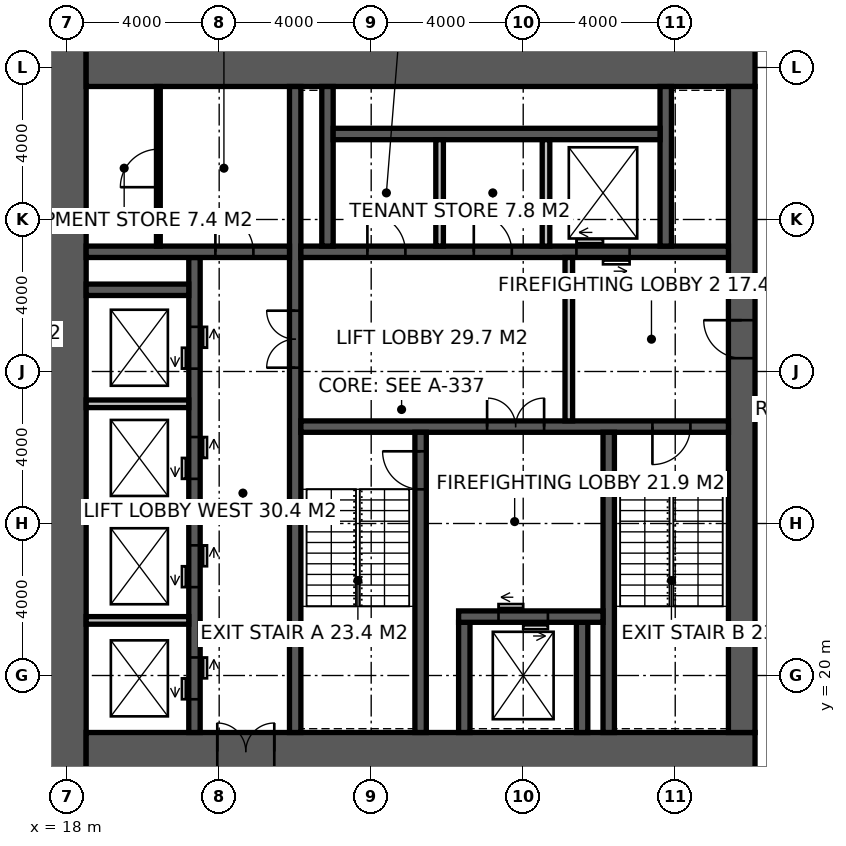
"""IFC4 building model, lengths in metres.
Left out: names, types, materials, properties, quantities, classifications, styles, units other than length and angle.
Written with IfcOpenShell. Run it as: python <this file> out.ifc"""

import sys

from ifc_helpers import new_model, si_unit, direction, frame, frame_2d, origin, place, context, subcontext, project, spatial, rectangle, extrude, element, fill, save


model = new_model("IFC4")
c1 = context("Model", 3, precision=1e-05, world=origin(), true_north=direction((0.0, 1.0)))
c2 = subcontext(c1, "Body", "Model", "MODEL_VIEW")
j1 = project(units=[si_unit("LENGTHUNIT", "METRE"), si_unit("PLANEANGLEUNIT", "RADIAN")], contexts=[c1])
p1 = place(None, origin())
s1 = spatial("IfcSite", under=j1, at=p1, CompositionType="ELEMENT")
p2 = place(p1, origin())
s2 = spatial("IfcBuilding", under=s1, at=p2, CompositionType="ELEMENT")
p3 = place(p2, frame((0.0, 0.0, 226.2)))
s3 = spatial("IfcBuildingStorey", under=s2, at=p3, CompositionType="ELEMENT", Elevation=226.2)
p4 = place(p3, frame((18.0, 17.5, -0.15), z_axis=(0.0, 0.0, 1.0), x_axis=(0.0, 1.0, 0.0)))
e1 = element("IfcWall", 1, at=p4, inside=s3, PredefinedType="SHEAR", context=c2, shape_type="SweptSolid", body=[
    extrude(rectangle(XDim=19.0, YDim=1.0, at=frame_2d((9.5, 0.0))), origin(), (0.0, 0.0, 1.0), 4.0),
])
p5 = place(p3, frame((18.5, 18.0, -0.15), z_axis=(0.0, 0.0, 1.0), x_axis=(1.0, 0.0, 0.0)))
e2 = element("IfcWall", 2, at=p5, inside=s3, PredefinedType="SHEAR", context=c2, shape_type="SweptSolid", body=[
    extrude(rectangle(XDim=17.6, YDim=1.0, at=frame_2d((8.8, 0.0))), origin(), (0.0, 0.0, 1.0), 4.0),
])
p6 = place(p5, frame((3.45, 0.0, 0.15)))
e3 = element("IfcOpeningElement", 3, at=p6, cuts=e2, PredefinedType="OPENING", context=c2, shape_type="SweptSolid", body=[
    extrude(rectangle(XDim=1.5, YDim=2.4, at=frame_2d((0.75, 1.2))), frame((0.0, 0.51, 0.0), z_axis=(0.0, -1.0, 0.0), x_axis=(1.0, 0.0, 0.0)), (0.0, 0.0, 1.0), 1.02),
])
p7 = place(p3, frame((18.5, 36.0, -0.15), z_axis=(0.0, 0.0, 1.0), x_axis=(1.0, 0.0, 0.0)))
e4 = element("IfcWall", 4, at=p7, inside=s3, PredefinedType="SHEAR", context=c2, shape_type="SweptSolid", body=[
    extrude(rectangle(XDim=17.6, YDim=1.0, at=frame_2d((8.8, 0.0))), origin(), (0.0, 0.0, 1.0), 4.0),
])
p8 = place(p3, frame((35.75, 18.5, -0.15), z_axis=(0.0, 0.0, 1.0), x_axis=(0.0, 1.0, 0.0)))
e5 = element("IfcWall", 5, at=p8, inside=s3, PredefinedType="SHEAR", context=c2, shape_type="SweptSolid", body=[
    extrude(rectangle(XDim=17.0, YDim=0.7, at=frame_2d((8.5, 0.0))), origin(), (0.0, 0.0, 1.0), 4.0),
])
p9 = place(p8, frame((9.85, 0.0, 0.15)))
e6 = element("IfcOpeningElement", 6, at=p9, cuts=e5, PredefinedType="OPENING", context=c2, shape_type="SweptSolid", body=[
    extrude(rectangle(XDim=1.0, YDim=2.2, at=frame_2d((0.5, 1.1))), frame((0.0, 0.36, 0.0), z_axis=(0.0, -1.0, 0.0), x_axis=(1.0, 0.0, 0.0)), (0.0, 0.0, 1.0), 0.72),
])
p10 = place(p3, frame((24.0, 18.5, -0.15), z_axis=(0.0, 0.0, 1.0), x_axis=(0.0, 1.0, 0.0)))
e7 = element("IfcWall", 7, at=p10, inside=s3, PredefinedType="SHEAR", context=c2, shape_type="SweptSolid", body=[
    extrude(rectangle(XDim=17.0, YDim=0.3, at=frame_2d((8.5, 0.0))), origin(), (0.0, 0.0, 1.0), 4.0),
])
p11 = place(p10, frame((9.6, 0.0, 0.15)))
e8 = element("IfcOpeningElement", 8, at=p11, cuts=e7, PredefinedType="OPENING", context=c2, shape_type="SweptSolid", body=[
    extrude(rectangle(XDim=1.5, YDim=2.4, at=frame_2d((0.75, 1.2))), frame((0.0, 0.16, 0.0), z_axis=(0.0, -1.0, 0.0), x_axis=(1.0, 0.0, 0.0)), (0.0, 0.0, 1.0), 0.32),
])
p12 = place(p3, frame((24.15, 26.55, -0.15), z_axis=(0.0, 0.0, 1.0), x_axis=(1.0, 0.0, 0.0)))
e9 = element("IfcWall", 9, at=p12, inside=s3, PredefinedType="SHEAR", context=c2, shape_type="SweptSolid", body=[
    extrude(rectangle(XDim=11.25, YDim=0.3, at=frame_2d((5.625, 0.0))), origin(), (0.0, 0.0, 1.0), 4.0),
])
p13 = place(p12, frame((9.25, 0.0, 0.15)))
e10 = element("IfcOpeningElement", 10, at=p13, cuts=e9, PredefinedType="OPENING", context=c2, shape_type="SweptSolid", body=[
    extrude(rectangle(XDim=1.0, YDim=2.2, at=frame_2d((0.5, 1.1))), frame((0.0, 0.16, 0.0), z_axis=(0.0, -1.0, 0.0), x_axis=(1.0, 0.0, 0.0)), (0.0, 0.0, 1.0), 0.32),
])
p14 = place(p12, frame((4.9, 0.0, 0.15)))
e11 = element("IfcOpeningElement", 11, at=p14, cuts=e9, PredefinedType="OPENING", context=c2, shape_type="SweptSolid", body=[
    extrude(rectangle(XDim=1.5, YDim=2.4, at=frame_2d((0.75, 1.2))), frame((0.0, 0.16, 0.0), z_axis=(0.0, -1.0, 0.0), x_axis=(1.0, 0.0, 0.0)), (0.0, 0.0, 1.0), 0.32),
])
p15 = place(p3, frame((27.3, 18.5, -0.15), z_axis=(0.0, 0.0, 1.0), x_axis=(0.0, 1.0, 0.0)))
e12 = element("IfcWall", 12, at=p15, inside=s3, PredefinedType="SHEAR", context=c2, shape_type="SweptSolid", body=[
    extrude(rectangle(XDim=7.9, YDim=0.3, at=frame_2d((3.95, 0.0))), origin(), (0.0, 0.0, 1.0), 4.0),
])
p16 = place(p15, frame((6.4, 0.0, 0.15)))
e13 = element("IfcOpeningElement", 13, at=p16, cuts=e12, PredefinedType="OPENING", context=c2, shape_type="SweptSolid", body=[
    extrude(rectangle(XDim=1.0, YDim=2.2, at=frame_2d((0.5, 1.1))), frame((0.0, 0.16, 0.0), z_axis=(0.0, -1.0, 0.0), x_axis=(1.0, 0.0, 0.0)), (0.0, 0.0, 1.0), 0.32),
])
p17 = place(p3, frame((32.25, 18.5, -0.15), z_axis=(0.0, 0.0, 1.0), x_axis=(0.0, 1.0, 0.0)))
e14 = element("IfcWall", 14, at=p17, inside=s3, PredefinedType="SHEAR", context=c2, shape_type="SweptSolid", body=[
    extrude(rectangle(XDim=7.9, YDim=0.3, at=frame_2d((3.95, 0.0))), origin(), (0.0, 0.0, 1.0), 4.0),
])
for number, where, z_axis, x_axis in (
    (15, (28.45, 18.5, -0.15), (0.0, 0.0, 1.0), (0.0, 1.0, 0.0)),
    (16, (31.55, 18.5, -0.15), (0.0, 0.0, 1.0), (0.0, 1.0, 0.0)),
):
    element("IfcWall", number, at=place(p3, frame(where, z_axis=z_axis, x_axis=x_axis)), inside=s3, PredefinedType="SHEAR", context=c2, shape_type="SweptSolid", body=[
        extrude(rectangle(XDim=2.9, YDim=0.3, at=frame_2d((1.45, 0.0))), origin(), (0.0, 0.0, 1.0), 4.0),
    ])
p18 = place(p3, frame((28.3, 21.55, -0.15), z_axis=(0.0, 0.0, 1.0), x_axis=(1.0, 0.0, 0.0)))
e17 = element("IfcWall", 17, at=p18, inside=s3, PredefinedType="SHEAR", context=c2, shape_type="SweptSolid", body=[
    extrude(rectangle(XDim=3.8, YDim=0.3, at=frame_2d((1.9, 0.0))), origin(), (0.0, 0.0, 1.0), 4.0),
])
p19 = place(p18, frame((1.05, 0.0, 0.15)))
e18 = element("IfcOpeningElement", 18, at=p19, cuts=e17, PredefinedType="OPENING", context=c2, shape_type="SweptSolid", body=[
    extrude(rectangle(XDim=1.3, YDim=2.4, at=frame_2d((0.65, 1.2))), frame((0.0, 0.16, 0.0), z_axis=(0.0, -1.0, 0.0), x_axis=(1.0, 0.0, 0.0)), (0.0, 0.0, 1.0), 0.32),
])
p20 = place(p3, frame((24.15, 31.15, -0.15), z_axis=(0.0, 0.0, 1.0), x_axis=(1.0, 0.0, 0.0)))
e19 = element("IfcWall", 19, at=p20, inside=s3, PredefinedType="SHEAR", context=c2, shape_type="SweptSolid", body=[
    extrude(rectangle(XDim=11.25, YDim=0.3, at=frame_2d((5.625, 0.0))), origin(), (0.0, 0.0, 1.0), 4.0),
])
p21 = place(p20, frame((1.75, 0.0, 0.15)))
e20 = element("IfcOpeningElement", 20, at=p21, cuts=e19, PredefinedType="OPENING", context=c2, shape_type="SweptSolid", body=[
    extrude(rectangle(XDim=1.0, YDim=2.2, at=frame_2d((0.5, 1.1))), frame((0.0, 0.16, 0.0), z_axis=(0.0, -1.0, 0.0), x_axis=(1.0, 0.0, 0.0)), (0.0, 0.0, 1.0), 0.32),
])
p22 = place(p20, frame((4.55, 0.0, 0.15)))
e21 = element("IfcOpeningElement", 21, at=p22, cuts=e19, PredefinedType="OPENING", context=c2, shape_type="SweptSolid", body=[
    extrude(rectangle(XDim=1.0, YDim=2.2, at=frame_2d((0.5, 1.1))), frame((0.0, 0.16, 0.0), z_axis=(0.0, -1.0, 0.0), x_axis=(1.0, 0.0, 0.0)), (0.0, 0.0, 1.0), 0.32),
])
p23 = place(p20, frame((7.25, 0.0, 0.15)))
e22 = element("IfcOpeningElement", 22, at=p23, cuts=e19, PredefinedType="OPENING", context=c2, shape_type="SweptSolid", body=[
    extrude(rectangle(XDim=1.4, YDim=2.4, at=frame_2d((0.7, 1.2))), frame((0.0, 0.16, 0.0), z_axis=(0.0, -1.0, 0.0), x_axis=(1.0, 0.0, 0.0)), (0.0, 0.0, 1.0), 0.32),
])
p24 = place(p3, frame((21.35, 18.5, -0.15), z_axis=(0.0, 0.0, 1.0), x_axis=(0.0, 1.0, 0.0)))
e23 = element("IfcWall", 23, at=p24, inside=s3, PredefinedType="SHEAR", context=c2, shape_type="SweptSolid", body=[
    extrude(rectangle(XDim=12.5, YDim=0.3, at=frame_2d((6.25, 0.0))), origin(), (0.0, 0.0, 1.0), 4.0),
])
p25 = place(p24, frame((0.875, 0.0, 0.15)))
e24 = element("IfcOpeningElement", 24, at=p25, cuts=e23, PredefinedType="OPENING", context=c2, shape_type="SweptSolid", body=[
    extrude(rectangle(XDim=1.1, YDim=2.2, at=frame_2d((0.55, 1.1))), frame((0.0, 0.16, 0.0), z_axis=(0.0, -1.0, 0.0), x_axis=(1.0, 0.0, 0.0)), (0.0, 0.0, 1.0), 0.32),
])
p26 = place(p24, frame((3.825, 0.0, 0.15)))
e25 = element("IfcOpeningElement", 25, at=p26, cuts=e23, PredefinedType="OPENING", context=c2, shape_type="SweptSolid", body=[
    extrude(rectangle(XDim=1.1, YDim=2.2, at=frame_2d((0.55, 1.1))), frame((0.0, 0.16, 0.0), z_axis=(0.0, -1.0, 0.0), x_axis=(1.0, 0.0, 0.0)), (0.0, 0.0, 1.0), 0.32),
])
p27 = place(p24, frame((6.675, 0.0, 0.15)))
e26 = element("IfcOpeningElement", 26, at=p27, cuts=e23, PredefinedType="OPENING", context=c2, shape_type="SweptSolid", body=[
    extrude(rectangle(XDim=1.1, YDim=2.2, at=frame_2d((0.55, 1.1))), frame((0.0, 0.16, 0.0), z_axis=(0.0, -1.0, 0.0), x_axis=(1.0, 0.0, 0.0)), (0.0, 0.0, 1.0), 0.32),
])
p28 = place(p24, frame((9.575, 0.0, 0.15)))
e27 = element("IfcOpeningElement", 27, at=p28, cuts=e23, PredefinedType="OPENING", context=c2, shape_type="SweptSolid", body=[
    extrude(rectangle(XDim=1.1, YDim=2.2, at=frame_2d((0.55, 1.1))), frame((0.0, 0.16, 0.0), z_axis=(0.0, -1.0, 0.0), x_axis=(1.0, 0.0, 0.0)), (0.0, 0.0, 1.0), 0.32),
])
p29 = place(p3, frame((18.5, 31.15, -0.15), z_axis=(0.0, 0.0, 1.0), x_axis=(1.0, 0.0, 0.0)))
e28 = element("IfcWall", 28, at=p29, inside=s3, PredefinedType="SHEAR", context=c2, shape_type="SweptSolid", body=[
    extrude(rectangle(XDim=5.35, YDim=0.3, at=frame_2d((2.675, 0.0))), origin(), (0.0, 0.0, 1.0), 4.0),
])
p30 = place(p29, frame((3.4, 0.0, 0.15)))
e29 = element("IfcOpeningElement", 29, at=p30, cuts=e28, PredefinedType="OPENING", context=c2, shape_type="SweptSolid", body=[
    extrude(rectangle(XDim=1.0, YDim=2.2, at=frame_2d((0.5, 1.1))), frame((0.0, 0.16, 0.0), z_axis=(0.0, -1.0, 0.0), x_axis=(1.0, 0.0, 0.0)), (0.0, 0.0, 1.0), 0.32),
])
p31 = place(p3, frame((18.5, 30.15, -0.15), z_axis=(0.0, 0.0, 1.0), x_axis=(1.0, 0.0, 0.0)))
e30 = element("IfcWall", 30, at=p31, inside=s3, PredefinedType="SHEAR", context=c2, shape_type="SweptSolid", body=[
    extrude(rectangle(XDim=2.7, YDim=0.3, at=frame_2d((1.35, 0.0))), origin(), (0.0, 0.0, 1.0), 4.0),
])
for number, where, z_axis, x_axis in (
    (31, (24.85, 31.3, -0.15), (0.0, 0.0, 1.0), (0.0, 1.0, 0.0)),
    (32, (33.75, 31.3, -0.15), (0.0, 0.0, 1.0), (0.0, 1.0, 0.0)),
):
    element("IfcWall", number, at=place(p3, frame(where, z_axis=z_axis, x_axis=x_axis)), inside=s3, PredefinedType="SHEAR", context=c2, shape_type="SweptSolid", body=[
        extrude(rectangle(XDim=4.2, YDim=0.3, at=frame_2d((2.1, 0.0))), origin(), (0.0, 0.0, 1.0), 4.0),
    ])
p32 = place(p3, frame((25.0, 34.25, -0.15), z_axis=(0.0, 0.0, 1.0), x_axis=(1.0, 0.0, 0.0)))
e33 = element("IfcWall", 33, at=p32, inside=s3, PredefinedType="SHEAR", context=c2, shape_type="SweptSolid", body=[
    extrude(rectangle(XDim=8.6, YDim=0.3, at=frame_2d((4.3, 0.0))), origin(), (0.0, 0.0, 1.0), 4.0),
])
p33 = place(p3, frame((27.8, 31.3, 0.0), z_axis=(0.0, 0.0, 1.0), x_axis=(0.0, 1.0, 0.0)))
e34 = element("IfcWall", 34, at=p33, inside=s3, PredefinedType="SOLIDWALL", context=c2, shape_type="SweptSolid", body=[
    extrude(rectangle(XDim=2.8, YDim=0.2, at=frame_2d((1.4, 0.0))), origin(), (0.0, 0.0, 1.0), 3.85),
])
p34 = place(p3, frame((30.6, 31.3, -0.15), z_axis=(0.0, 0.0, 1.0), x_axis=(0.0, 1.0, 0.0)))
e35 = element("IfcWall", 35, at=p34, inside=s3, PredefinedType="SOLIDWALL", context=c2, shape_type="SweptSolid", body=[
    extrude(rectangle(XDim=2.8, YDim=0.2, at=frame_2d((1.4, 0.0))), origin(), (0.0, 0.0, 1.0), 4.0),
])
for number, where, z_axis, x_axis in (
    (36, (18.5, 21.45, -0.15), (0.0, 0.0, 1.0), (1.0, 0.0, 0.0)),
    (37, (18.5, 24.3, -0.15), (0.0, 0.0, 1.0), (1.0, 0.0, 0.0)),
    (38, (18.5, 27.15, -0.15), (0.0, 0.0, 1.0), (1.0, 0.0, 0.0)),
):
    element("IfcWall", number, at=place(p3, frame(where, z_axis=z_axis, x_axis=x_axis)), inside=s3, PredefinedType="SOLIDWALL", context=c2, shape_type="SweptSolid", body=[
        extrude(rectangle(XDim=2.7, YDim=0.2, at=frame_2d((1.35, 0.0))), origin(), (0.0, 0.0, 1.0), 4.0),
    ])
p35 = place(p3, frame((31.2, 26.7, 0.0), z_axis=(0.0, 0.0, 1.0), x_axis=(0.0, 1.0, 0.0)))
e39 = element("IfcWall", 39, at=p35, inside=s3, PredefinedType="SOLIDWALL", context=c2, shape_type="SweptSolid", body=[
    extrude(rectangle(XDim=4.3, YDim=0.2, at=frame_2d((2.15, 0.0))), origin(), (0.0, 0.0, 1.0), 3.85),
])
p36 = place(p3, frame((20.4, 31.3, 0.0), z_axis=(0.0, 0.0, 1.0), x_axis=(0.0, 1.0, 0.0)))
e40 = element("IfcWall", 40, at=p36, inside=s3, PredefinedType="PARTITIONING", context=c2, shape_type="SweptSolid", body=[
    extrude(rectangle(XDim=4.2, YDim=0.1, at=frame_2d((2.1, 0.0))), origin(), (0.0, 0.0, 1.0), 3.85),
])
p37 = place(p36, frame((1.55, 0.0, 0.0)))
e41 = element("IfcOpeningElement", 41, at=p37, cuts=e40, PredefinedType="OPENING", context=c2, shape_type="SweptSolid", body=[
    extrude(rectangle(XDim=1.0, YDim=2.2, at=frame_2d((0.5, 1.1))), frame((0.0, 0.06, 0.0), z_axis=(0.0, -1.0, 0.0), x_axis=(1.0, 0.0, 0.0)), (0.0, 0.0, 1.0), 0.12),
])
p38 = place(p16, origin())
e42 = element("IfcDoor", 42, at=p38, inside=s3, OperationType="SINGLE_SWING_RIGHT", PredefinedType="DOOR", context=c2, shape_type="SweptSolid", body=[
    extrude(rectangle(XDim=1.0, YDim=2.2, at=frame_2d((0.5, 1.1))), frame((0.0, 0.025, 0.0), z_axis=(0.0, -1.0, 0.0), x_axis=(1.0, 0.0, 0.0)), (0.0, 0.0, 1.0), 0.05),
])
fill(e13, e42)
p39 = place(p13, frame((1.0, 0.0, 0.0), z_axis=(0.0, 0.0, 1.0), x_axis=(-1.0, 0.0, 0.0)))
e43 = element("IfcDoor", 43, at=p39, inside=s3, OperationType="SINGLE_SWING_RIGHT", PredefinedType="DOOR", context=c2, shape_type="SweptSolid", body=[
    extrude(rectangle(XDim=1.0, YDim=2.2, at=frame_2d((0.5, 1.1))), frame((0.0, 0.025, 0.0), z_axis=(0.0, -1.0, 0.0), x_axis=(1.0, 0.0, 0.0)), (0.0, 0.0, 1.0), 0.05),
])
fill(e10, e43)
p40 = place(p9, origin())
e44 = element("IfcDoor", 44, at=p40, inside=s3, OperationType="SINGLE_SWING_RIGHT", PredefinedType="DOOR", context=c2, shape_type="SweptSolid", body=[
    extrude(rectangle(XDim=1.0, YDim=2.2, at=frame_2d((0.5, 1.1))), frame((0.0, 0.025, 0.0), z_axis=(0.0, -1.0, 0.0), x_axis=(1.0, 0.0, 0.0)), (0.0, 0.0, 1.0), 0.05),
])
fill(e6, e44)
p41 = place(p14, origin())
e45 = element("IfcDoor", 45, at=p41, inside=s3, OperationType="DOUBLE_DOOR_DOUBLE_SWING", PredefinedType="DOOR", context=c2, shape_type="SweptSolid", body=[
    extrude(rectangle(XDim=1.5, YDim=2.4, at=frame_2d((0.75, 1.2))), frame((0.0, 0.025, 0.0), z_axis=(0.0, -1.0, 0.0), x_axis=(1.0, 0.0, 0.0)), (0.0, 0.0, 1.0), 0.05),
])
fill(e11, e45)
p42 = place(p11, origin())
e46 = element("IfcDoor", 46, at=p42, inside=s3, OperationType="DOUBLE_DOOR_DOUBLE_SWING", PredefinedType="DOOR", context=c2, shape_type="SweptSolid", body=[
    extrude(rectangle(XDim=1.5, YDim=2.4, at=frame_2d((0.75, 1.2))), frame((0.0, 0.025, 0.0), z_axis=(0.0, -1.0, 0.0), x_axis=(1.0, 0.0, 0.0)), (0.0, 0.0, 1.0), 0.05),
])
fill(e8, e46)
p43 = place(p30, origin())
e47 = element("IfcDoor", 47, at=p43, inside=s3, OperationType="SINGLE_SWING_LEFT", PredefinedType="DOOR", context=c2, shape_type="SweptSolid", body=[
    extrude(rectangle(XDim=1.0, YDim=2.2, at=frame_2d((0.5, 1.1))), frame((0.0, 0.025, 0.0), z_axis=(0.0, -1.0, 0.0), x_axis=(1.0, 0.0, 0.0)), (0.0, 0.0, 1.0), 0.05),
])
fill(e29, e47)
p44 = place(p37, origin())
e48 = element("IfcDoor", 48, at=p44, inside=s3, OperationType="SINGLE_SWING_LEFT", PredefinedType="DOOR", context=c2, shape_type="SweptSolid", body=[
    extrude(rectangle(XDim=1.0, YDim=2.2, at=frame_2d((0.5, 1.1))), frame((0.0, 0.025, 0.0), z_axis=(0.0, -1.0, 0.0), x_axis=(1.0, 0.0, 0.0)), (0.0, 0.0, 1.0), 0.05),
])
fill(e41, e48)
p45 = place(p21, origin())
e49 = element("IfcDoor", 49, at=p45, inside=s3, OperationType="SINGLE_SWING_LEFT", PredefinedType="DOOR", context=c2, shape_type="SweptSolid", body=[
    extrude(rectangle(XDim=1.0, YDim=2.2, at=frame_2d((0.5, 1.1))), frame((0.0, 0.025, 0.0), z_axis=(0.0, -1.0, 0.0), x_axis=(1.0, 0.0, 0.0)), (0.0, 0.0, 1.0), 0.05),
])
fill(e20, e49)
p46 = place(p22, origin())
e50 = element("IfcDoor", 50, at=p46, inside=s3, OperationType="SINGLE_SWING_LEFT", PredefinedType="DOOR", context=c2, shape_type="SweptSolid", body=[
    extrude(rectangle(XDim=1.0, YDim=2.2, at=frame_2d((0.5, 1.1))), frame((0.0, 0.025, 0.0), z_axis=(0.0, -1.0, 0.0), x_axis=(1.0, 0.0, 0.0)), (0.0, 0.0, 1.0), 0.05),
])
fill(e21, e50)
p47 = place(p6, origin())
e51 = element("IfcDoor", 51, at=p47, inside=s3, OperationType="DOUBLE_DOOR_DOUBLE_SWING", PredefinedType="DOOR", context=c2, shape_type="SweptSolid", body=[
    extrude(rectangle(XDim=1.5, YDim=2.4, at=frame_2d((0.75, 1.2))), frame((0.0, 0.025, 0.0), z_axis=(0.0, -1.0, 0.0), x_axis=(1.0, 0.0, 0.0)), (0.0, 0.0, 1.0), 0.05),
])
fill(e3, e51)
p48 = place(p19, origin())
e52 = element("IfcDoor", 52, at=p48, inside=s3, OperationType="DOUBLE_DOOR_SLIDING", PredefinedType="DOOR", context=c2, shape_type="SweptSolid", body=[
    extrude(rectangle(XDim=1.3, YDim=2.4, at=frame_2d((0.65, 1.2))), frame((0.0, 0.025, 0.0), z_axis=(0.0, -1.0, 0.0), x_axis=(1.0, 0.0, 0.0)), (0.0, 0.0, 1.0), 0.05),
])
fill(e18, e52)
p49 = place(p23, origin())
e53 = element("IfcDoor", 53, at=p49, inside=s3, OperationType="DOUBLE_DOOR_SLIDING", PredefinedType="DOOR", context=c2, shape_type="SweptSolid", body=[
    extrude(rectangle(XDim=1.4, YDim=2.4, at=frame_2d((0.7, 1.2))), frame((0.0, 0.025, 0.0), z_axis=(0.0, -1.0, 0.0), x_axis=(1.0, 0.0, 0.0)), (0.0, 0.0, 1.0), 0.05),
])
fill(e22, e53)
p50 = place(p25, origin())
e54 = element("IfcDoor", 54, at=p50, inside=s3, OperationType="DOUBLE_DOOR_SLIDING", PredefinedType="DOOR", context=c2, shape_type="SweptSolid", body=[
    extrude(rectangle(XDim=1.1, YDim=2.2, at=frame_2d((0.55, 1.1))), frame((0.0, 0.025, 0.0), z_axis=(0.0, -1.0, 0.0), x_axis=(1.0, 0.0, 0.0)), (0.0, 0.0, 1.0), 0.05),
])
fill(e24, e54)
p51 = place(p26, origin())
e55 = element("IfcDoor", 55, at=p51, inside=s3, OperationType="DOUBLE_DOOR_SLIDING", PredefinedType="DOOR", context=c2, shape_type="SweptSolid", body=[
    extrude(rectangle(XDim=1.1, YDim=2.2, at=frame_2d((0.55, 1.1))), frame((0.0, 0.025, 0.0), z_axis=(0.0, -1.0, 0.0), x_axis=(1.0, 0.0, 0.0)), (0.0, 0.0, 1.0), 0.05),
])
fill(e25, e55)
p52 = place(p27, origin())
e56 = element("IfcDoor", 56, at=p52, inside=s3, OperationType="DOUBLE_DOOR_SLIDING", PredefinedType="DOOR", context=c2, shape_type="SweptSolid", body=[
    extrude(rectangle(XDim=1.1, YDim=2.2, at=frame_2d((0.55, 1.1))), frame((0.0, 0.025, 0.0), z_axis=(0.0, -1.0, 0.0), x_axis=(1.0, 0.0, 0.0)), (0.0, 0.0, 1.0), 0.05),
])
fill(e26, e56)
p53 = place(p28, origin())
e57 = element("IfcDoor", 57, at=p53, inside=s3, OperationType="DOUBLE_DOOR_SLIDING", PredefinedType="DOOR", context=c2, shape_type="SweptSolid", body=[
    extrude(rectangle(XDim=1.1, YDim=2.2, at=frame_2d((0.55, 1.1))), frame((0.0, 0.025, 0.0), z_axis=(0.0, -1.0, 0.0), x_axis=(1.0, 0.0, 0.0)), (0.0, 0.0, 1.0), 0.05),
])
fill(e27, e57)
save(model, sys.argv[1])
